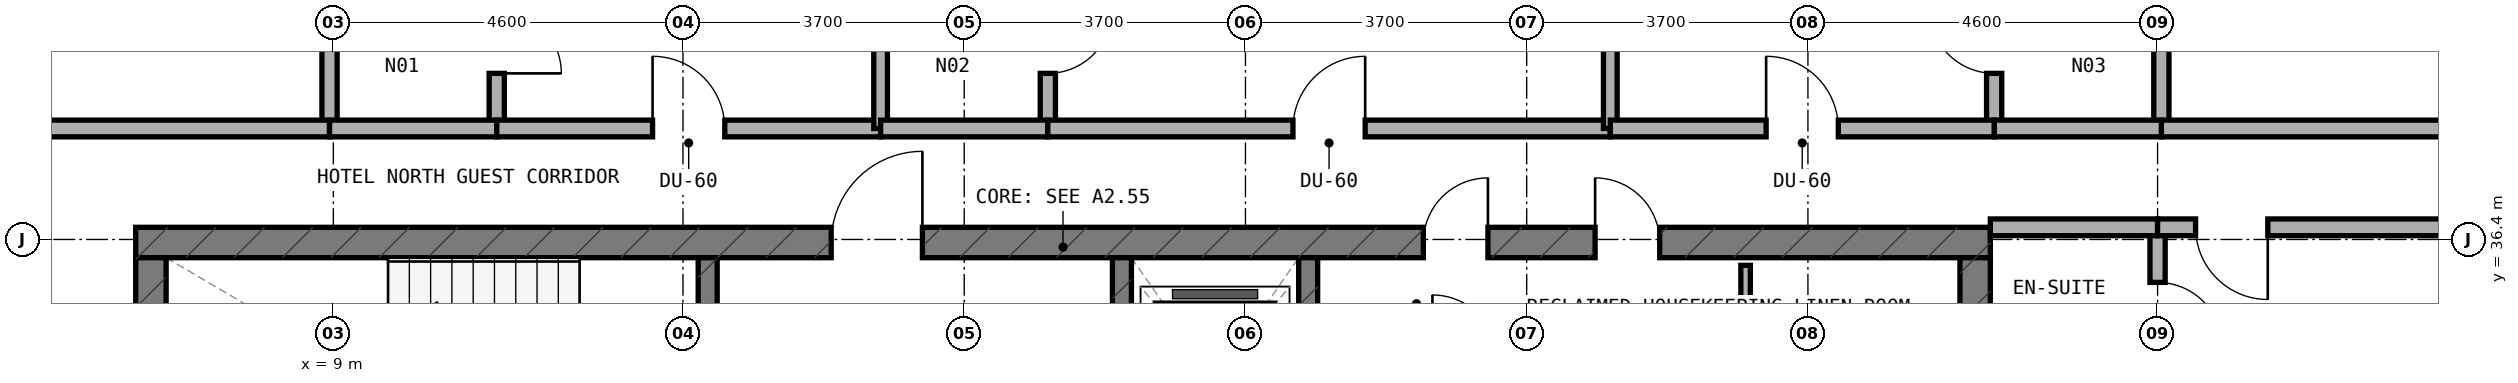
"""IFC4 building model, lengths in metres.
Left out: names, types, materials, properties, quantities, classifications, styles, units other than length and angle.
Written with IfcOpenShell. Run it as: python <this file> out.ifc"""

import sys

from ifc_helpers import new_model, si_unit, direction, frame, frame_2d, origin, place, context, subcontext, project, spatial, rectangle, extrude, element, fill, save


model = new_model("IFC4")
c1 = context("Model", 3, precision=1e-05, world=origin(), true_north=direction((0.0, 1.0)))
c2 = subcontext(c1, "Body", "Model", "MODEL_VIEW")
j1 = project(units=[si_unit("LENGTHUNIT", "METRE"), si_unit("PLANEANGLEUNIT", "RADIAN")], contexts=[c1])
p1 = place(None, origin())
s1 = spatial("IfcSite", under=j1, at=p1, CompositionType="ELEMENT")
p2 = place(p1, origin())
s2 = spatial("IfcBuilding", under=s1, at=p2, CompositionType="ELEMENT")
p3 = place(p2, frame((0.0, 0.0, 254.0)))
s3 = spatial("IfcBuildingStorey", under=s2, at=p3, CompositionType="ELEMENT", Elevation=254.0)
p4 = place(p3, frame((6.4, 36.36, 0.0), z_axis=(0.0, 0.0, 1.0), x_axis=(1.0, 0.0, 0.0)))
e1 = element("IfcWall", 1, at=p4, inside=s3, PredefinedType="SHEAR", context=c2, shape_type="SweptSolid", body=[
    extrude(rectangle(XDim=24.4, YDim=0.4, at=frame_2d((12.2, 0.0))), origin(), (0.0, 0.0, 1.0), 3.6),
])
p5 = place(p4, frame((9.15, 0.0, 0.0)))
e2 = element("IfcOpeningElement", 2, at=p5, cuts=e1, PredefinedType="OPENING", context=c2, shape_type="SweptSolid", body=[
    extrude(rectangle(XDim=1.2, YDim=2.15, at=frame_2d((0.6, 1.075))), frame((0.0, 0.21, 0.0), z_axis=(0.0, -1.0, 0.0), x_axis=(1.0, 0.0, 0.0)), (0.0, 0.0, 1.0), 0.42),
])
p6 = place(p4, frame((19.2, 0.0, 0.0)))
e3 = element("IfcOpeningElement", 3, at=p6, cuts=e1, PredefinedType="OPENING", context=c2, shape_type="SweptSolid", body=[
    extrude(rectangle(XDim=0.85, YDim=2.1, at=frame_2d((0.425, 1.05))), frame((0.0, 0.21, 0.0), z_axis=(0.0, -1.0, 0.0), x_axis=(1.0, 0.0, 0.0)), (0.0, 0.0, 1.0), 0.42),
])
p7 = place(p4, frame((16.94, 0.0, 0.0)))
e4 = element("IfcOpeningElement", 4, at=p7, cuts=e1, PredefinedType="OPENING", context=c2, shape_type="SweptSolid", body=[
    extrude(rectangle(XDim=0.85, YDim=2.1, at=frame_2d((0.425, 1.05))), frame((0.0, 0.21, 0.0), z_axis=(0.0, -1.0, 0.0), x_axis=(1.0, 0.0, 0.0)), (0.0, 0.0, 1.0), 0.42),
])
for number, where, z_axis, x_axis in (
    (5, (6.6, 33.0, 0.0), (0.0, 0.0, 1.0), (0.0, 1.0, 0.0)),
    (6, (30.6, 33.0, 0.0), (0.0, 0.0, 1.0), (0.0, 1.0, 0.0)),
):
    element("IfcWall", number, at=place(p3, frame(where, z_axis=z_axis, x_axis=x_axis)), inside=s3, PredefinedType="SHEAR", context=c2, shape_type="SweptSolid", body=[
        extrude(rectangle(XDim=3.16, YDim=0.4, at=frame_2d((1.58, 0.0))), origin(), (0.0, 0.0, 1.0), 3.6),
    ])
p8 = place(p3, frame((13.925, 33.0, 0.0), z_axis=(0.0, 0.0, 1.0), x_axis=(0.0, 1.0, 0.0)))
e7 = element("IfcWall", 7, at=p8, inside=s3, PredefinedType="STANDARD", context=c2, shape_type="SweptSolid", body=[
    extrude(rectangle(XDim=3.16, YDim=0.25, at=frame_2d((1.58, 0.0))), origin(), (0.0, 0.0, 1.0), 3.32),
])
p9 = place(p8, frame((0.98, 0.0, 0.0)))
e8 = element("IfcOpeningElement", 8, at=p9, cuts=e7, PredefinedType="OPENING", context=c2, shape_type="SweptSolid", body=[
    extrude(rectangle(XDim=1.1, YDim=2.15, at=frame_2d((0.55, 1.075))), frame((0.0, 0.135, 0.0), z_axis=(0.0, -1.0, 0.0), x_axis=(1.0, 0.0, 0.0)), (0.0, 0.0, 1.0), 0.27),
])
p10 = place(p3, frame((19.375, 33.0, 0.0), z_axis=(0.0, 0.0, 1.0), x_axis=(0.0, 1.0, 0.0)))
e9 = element("IfcWall", 9, at=p10, inside=s3, PredefinedType="STANDARD", context=c2, shape_type="SweptSolid", body=[
    extrude(rectangle(XDim=3.16, YDim=0.25, at=frame_2d((1.58, 0.0))), origin(), (0.0, 0.0, 1.0), 3.32),
])
p11 = place(p10, frame((0.98, 0.0, 0.0)))
e10 = element("IfcOpeningElement", 10, at=p11, cuts=e9, PredefinedType="OPENING", context=c2, shape_type="SweptSolid", body=[
    extrude(rectangle(XDim=1.1, YDim=2.15, at=frame_2d((0.55, 1.075))), frame((0.0, 0.135, 0.0), z_axis=(0.0, -1.0, 0.0), x_axis=(1.0, 0.0, 0.0)), (0.0, 0.0, 1.0), 0.27),
])
p12 = place(p3, frame((21.825, 33.0, 0.0), z_axis=(0.0, 0.0, 1.0), x_axis=(0.0, 1.0, 0.0)))
e11 = element("IfcWall", 11, at=p12, inside=s3, PredefinedType="STANDARD", context=c2, shape_type="SweptSolid", body=[
    extrude(rectangle(XDim=3.16, YDim=0.25, at=frame_2d((1.58, 0.0))), origin(), (0.0, 0.0, 1.0), 3.32),
])
p13 = place(p3, frame((27.58, 33.1, 0.0), z_axis=(0.0, 0.0, 1.0), x_axis=(0.0, 1.0, 0.0)))
e12 = element("IfcWall", 12, at=p13, inside=s3, PredefinedType="PARTITIONING", context=c2, shape_type="SweptSolid", body=[
    extrude(rectangle(XDim=2.96, YDim=0.125, at=frame_2d((1.48, 0.0))), origin(), (0.0, 0.0, 1.0), 3.32),
])
p14 = place(p13, frame((1.055, 0.0, 0.0)))
e13 = element("IfcOpeningElement", 13, at=p14, cuts=e12, PredefinedType="OPENING", context=c2, shape_type="SweptSolid", body=[
    extrude(rectangle(XDim=0.85, YDim=2.1, at=frame_2d((0.425, 1.05))), frame((0.0, 0.073, 0.0), z_axis=(0.0, -1.0, 0.0), x_axis=(1.0, 0.0, 0.0)), (0.0, 0.0, 1.0), 0.145),
])
p15 = place(p3, frame((11.15, 37.96, 0.0), z_axis=(0.0, 0.0, 1.0), x_axis=(0.0, 1.0, 0.0)))
e14 = element("IfcWall", 14, at=p15, inside=s3, PredefinedType="PLUMBINGWALL", context=c2, shape_type="SweptSolid", body=[
    extrude(rectangle(XDim=2.1, YDim=0.2, at=frame_2d((1.05, 0.0))), origin(), (0.0, 0.0, 1.0), 2.845),
])
p16 = place(p15, frame((0.625, 0.0, 0.0)))
e15 = element("IfcOpeningElement", 15, at=p16, cuts=e14, PredefinedType="OPENING", context=c2, shape_type="SweptSolid", body=[
    extrude(rectangle(XDim=0.85, YDim=2.1, at=frame_2d((0.425, 1.05))), frame((0.0, 0.11, 0.0), z_axis=(0.0, -1.0, 0.0), x_axis=(1.0, 0.0, 0.0)), (0.0, 0.0, 1.0), 0.22),
])
p17 = place(p3, frame((8.95, 37.96, 0.0), z_axis=(0.0, 0.0, 1.0), x_axis=(0.0, 1.0, 0.0)))
e16 = element("IfcWall", 16, at=p17, inside=s3, PredefinedType="PLUMBINGWALL", context=c2, shape_type="SweptSolid", body=[
    extrude(rectangle(XDim=2.1, YDim=0.2, at=frame_2d((1.05, 0.0))), origin(), (0.0, 0.0, 1.0), 2.845),
])
p18 = place(p3, frame((3.36, 37.86, 0.0), z_axis=(0.0, 0.0, 1.0), x_axis=(1.0, 0.0, 0.0)))
e17 = element("IfcWall", 17, at=p18, inside=s3, PredefinedType="SOLIDWALL", context=c2, shape_type="SweptSolid", body=[
    extrude(rectangle(XDim=5.59, YDim=0.22, at=frame_2d((2.795, 0.0))), origin(), (0.0, 0.0, 1.0), 2.745),
])
p19 = place(p3, frame((8.95, 37.86, 0.0), z_axis=(0.0, 0.0, 1.0), x_axis=(1.0, 0.0, 0.0)))
e18 = element("IfcWall", 18, at=p19, inside=s3, PredefinedType="SOLIDWALL", context=c2, shape_type="SweptSolid", body=[
    extrude(rectangle(XDim=2.2, YDim=0.22, at=frame_2d((1.1, 0.0))), origin(), (0.0, 0.0, 1.0), 3.32),
])
p20 = place(p3, frame((11.15, 37.86, 0.0), z_axis=(0.0, 0.0, 1.0), x_axis=(1.0, 0.0, 0.0)))
e19 = element("IfcWall", 19, at=p20, inside=s3, PredefinedType="SOLIDWALL", context=c2, shape_type="SweptSolid", body=[
    extrude(rectangle(XDim=5.05, YDim=0.22, at=frame_2d((2.525, 0.0))), origin(), (0.0, 0.0, 1.0), 2.745),
])
p21 = place(p20, frame((2.05, 0.0, 0.0)))
e20 = element("IfcOpeningElement", 20, at=p21, cuts=e19, PredefinedType="OPENING", context=c2, shape_type="SweptSolid", body=[
    extrude(rectangle(XDim=0.95, YDim=2.1, at=frame_2d((0.475, 1.05))), frame((0.0, 0.12, 0.0), z_axis=(0.0, -1.0, 0.0), x_axis=(1.0, 0.0, 0.0)), (0.0, 0.0, 1.0), 0.24),
])
p22 = place(p3, frame((16.2, 37.86, 0.0), z_axis=(0.0, 0.0, 1.0), x_axis=(0.0, 1.0, 0.0)))
e21 = element("IfcWall", 21, at=p22, inside=s3, PredefinedType="SOLIDWALL", context=c2, shape_type="SweptSolid", body=[
    extrude(rectangle(XDim=5.28, YDim=0.18, at=frame_2d((2.64, 0.0))), origin(), (0.0, 0.0, 1.0), 2.745),
])
p23 = place(p3, frame((18.4, 37.96, 0.0), z_axis=(0.0, 0.0, 1.0), x_axis=(0.0, 1.0, 0.0)))
e22 = element("IfcWall", 22, at=p23, inside=s3, PredefinedType="PLUMBINGWALL", context=c2, shape_type="SweptSolid", body=[
    extrude(rectangle(XDim=2.1, YDim=0.2, at=frame_2d((1.05, 0.0))), origin(), (0.0, 0.0, 1.0), 2.845),
])
p24 = place(p23, frame((0.625, 0.0, 0.0)))
e23 = element("IfcOpeningElement", 23, at=p24, cuts=e22, PredefinedType="OPENING", context=c2, shape_type="SweptSolid", body=[
    extrude(rectangle(XDim=0.85, YDim=2.1, at=frame_2d((0.425, 1.05))), frame((0.0, 0.11, 0.0), z_axis=(0.0, -1.0, 0.0), x_axis=(1.0, 0.0, 0.0)), (0.0, 0.0, 1.0), 0.22),
])
p25 = place(p3, frame((16.2, 37.86, 0.0), z_axis=(0.0, 0.0, 1.0), x_axis=(1.0, 0.0, 0.0)))
e24 = element("IfcWall", 24, at=p25, inside=s3, PredefinedType="SOLIDWALL", context=c2, shape_type="SweptSolid", body=[
    extrude(rectangle(XDim=2.2, YDim=0.22, at=frame_2d((1.1, 0.0))), origin(), (0.0, 0.0, 1.0), 2.745),
])
p26 = place(p3, frame((18.4, 37.86, 0.0), z_axis=(0.0, 0.0, 1.0), x_axis=(1.0, 0.0, 0.0)))
e25 = element("IfcWall", 25, at=p26, inside=s3, PredefinedType="SOLIDWALL", context=c2, shape_type="SweptSolid", body=[
    extrude(rectangle(XDim=7.4, YDim=0.22, at=frame_2d((3.7, 0.0))), origin(), (0.0, 0.0, 1.0), 2.745),
])
p27 = place(p26, frame((3.225, 0.0, 0.0)))
e26 = element("IfcOpeningElement", 26, at=p27, cuts=e25, PredefinedType="OPENING", context=c2, shape_type="SweptSolid", body=[
    extrude(rectangle(XDim=0.95, YDim=2.1, at=frame_2d((0.475, 1.05))), frame((0.0, 0.12, 0.0), z_axis=(0.0, -1.0, 0.0), x_axis=(1.0, 0.0, 0.0)), (0.0, 0.0, 1.0), 0.24),
])
p28 = place(p3, frame((25.8, 37.86, 0.0), z_axis=(0.0, 0.0, 1.0), x_axis=(0.0, 1.0, 0.0)))
e27 = element("IfcWall", 27, at=p28, inside=s3, PredefinedType="SOLIDWALL", context=c2, shape_type="SweptSolid", body=[
    extrude(rectangle(XDim=5.28, YDim=0.18, at=frame_2d((2.64, 0.0))), origin(), (0.0, 0.0, 1.0), 2.745),
])
p29 = place(p3, frame((30.85, 37.96, 0.0), z_axis=(0.0, 0.0, 1.0), x_axis=(0.0, 1.0, 0.0)))
e28 = element("IfcWall", 28, at=p29, inside=s3, PredefinedType="PLUMBINGWALL", context=c2, shape_type="SweptSolid", body=[
    extrude(rectangle(XDim=2.1, YDim=0.2, at=frame_2d((1.05, 0.0))), origin(), (0.0, 0.0, 1.0), 2.845),
])
p30 = place(p29, frame((0.625, 0.0, 0.0)))
e29 = element("IfcOpeningElement", 29, at=p30, cuts=e28, PredefinedType="OPENING", context=c2, shape_type="SweptSolid", body=[
    extrude(rectangle(XDim=0.85, YDim=2.1, at=frame_2d((0.425, 1.05))), frame((0.0, 0.11, 0.0), z_axis=(0.0, -1.0, 0.0), x_axis=(1.0, 0.0, 0.0)), (0.0, 0.0, 1.0), 0.22),
])
p31 = place(p3, frame((33.05, 37.96, 0.0), z_axis=(0.0, 0.0, 1.0), x_axis=(0.0, 1.0, 0.0)))
e30 = element("IfcWall", 30, at=p31, inside=s3, PredefinedType="PLUMBINGWALL", context=c2, shape_type="SweptSolid", body=[
    extrude(rectangle(XDim=2.1, YDim=0.2, at=frame_2d((1.05, 0.0))), origin(), (0.0, 0.0, 1.0), 2.845),
])
p32 = place(p3, frame((33.05, 37.86, 0.0), z_axis=(0.0, 0.0, 1.0), x_axis=(1.0, 0.0, 0.0)))
e31 = element("IfcWall", 31, at=p32, inside=s3, PredefinedType="SOLIDWALL", context=c2, shape_type="SweptSolid", body=[
    extrude(rectangle(XDim=5.59, YDim=0.22, at=frame_2d((2.795, 0.0))), origin(), (0.0, 0.0, 1.0), 2.745),
])
p33 = place(p3, frame((30.85, 37.86, 0.0), z_axis=(0.0, 0.0, 1.0), x_axis=(1.0, 0.0, 0.0)))
e32 = element("IfcWall", 32, at=p33, inside=s3, PredefinedType="SOLIDWALL", context=c2, shape_type="SweptSolid", body=[
    extrude(rectangle(XDim=2.2, YDim=0.22, at=frame_2d((1.1, 0.0))), origin(), (0.0, 0.0, 1.0), 3.32),
])
p34 = place(p3, frame((25.8, 37.86, 0.0), z_axis=(0.0, 0.0, 1.0), x_axis=(1.0, 0.0, 0.0)))
e33 = element("IfcWall", 33, at=p34, inside=s3, PredefinedType="SOLIDWALL", context=c2, shape_type="SweptSolid", body=[
    extrude(rectangle(XDim=5.05, YDim=0.22, at=frame_2d((2.525, 0.0))), origin(), (0.0, 0.0, 1.0), 2.745),
])
p35 = place(p34, frame((2.05, 0.0, 0.0)))
e34 = element("IfcOpeningElement", 34, at=p35, cuts=e33, PredefinedType="OPENING", context=c2, shape_type="SweptSolid", body=[
    extrude(rectangle(XDim=0.95, YDim=2.1, at=frame_2d((0.475, 1.05))), frame((0.0, 0.12, 0.0), z_axis=(0.0, -1.0, 0.0), x_axis=(1.0, 0.0, 0.0)), (0.0, 0.0, 1.0), 0.24),
])
p36 = place(p3, frame((33.0, 34.36, 0.0), z_axis=(0.0, 0.0, 1.0), x_axis=(0.0, 1.0, 0.0)))
e35 = element("IfcWall", 35, at=p36, inside=s3, PredefinedType="PLUMBINGWALL", context=c2, shape_type="SweptSolid", body=[
    extrude(rectangle(XDim=2.1, YDim=0.2, at=frame_2d((1.05, 0.0))), origin(), (0.0, 0.0, 1.0), 3.32),
])
p37 = place(p36, frame((0.625, 0.0, 0.0)))
e36 = element("IfcOpeningElement", 36, at=p37, cuts=e35, PredefinedType="OPENING", context=c2, shape_type="SweptSolid", body=[
    extrude(rectangle(XDim=0.85, YDim=2.1, at=frame_2d((0.425, 1.05))), frame((0.0, 0.11, 0.0), z_axis=(0.0, -1.0, 0.0), x_axis=(1.0, 0.0, 0.0)), (0.0, 0.0, 1.0), 0.22),
])
p38 = place(p3, frame((30.8, 36.56, 0.0), z_axis=(0.0, 0.0, 1.0), x_axis=(1.0, 0.0, 0.0)))
e37 = element("IfcWall", 37, at=p38, inside=s3, PredefinedType="SOLIDWALL", context=c2, shape_type="SweptSolid", body=[
    extrude(rectangle(XDim=2.2, YDim=0.22, at=frame_2d((1.1, 0.0))), origin(), (0.0, 0.0, 1.0), 3.32),
])
p39 = place(p3, frame((33.0, 36.56, 0.0), z_axis=(0.0, 0.0, 1.0), x_axis=(1.0, 0.0, 0.0)))
e38 = element("IfcWall", 38, at=p39, inside=s3, PredefinedType="SOLIDWALL", context=c2, shape_type="SweptSolid", body=[
    extrude(rectangle(XDim=5.8, YDim=0.22, at=frame_2d((2.9, 0.0))), origin(), (0.0, 0.0, 1.0), 2.745),
])
p40 = place(p39, frame((0.5, 0.0, 0.0)))
e39 = element("IfcOpeningElement", 39, at=p40, cuts=e38, PredefinedType="OPENING", context=c2, shape_type="SweptSolid", body=[
    extrude(rectangle(XDim=0.95, YDim=2.1, at=frame_2d((0.475, 1.05))), frame((0.0, 0.12, 0.0), z_axis=(0.0, -1.0, 0.0), x_axis=(1.0, 0.0, 0.0)), (0.0, 0.0, 1.0), 0.24),
])
p41 = place(p5, origin())
e40 = element("IfcDoor", 40, at=p41, inside=s3, OperationType="SINGLE_SWING_RIGHT", PredefinedType="DOOR", context=c2, shape_type="SweptSolid", body=[
    extrude(rectangle(XDim=1.2, YDim=2.15, at=frame_2d((0.6, 1.075))), frame((0.0, 0.025, 0.0), z_axis=(0.0, -1.0, 0.0), x_axis=(1.0, 0.0, 0.0)), (0.0, 0.0, 1.0), 0.05),
])
fill(e2, e40)
p42 = place(p6, origin())
e41 = element("IfcDoor", 41, at=p42, inside=s3, OperationType="SINGLE_SWING_LEFT", PredefinedType="DOOR", context=c2, shape_type="SweptSolid", body=[
    extrude(rectangle(XDim=0.85, YDim=2.1, at=frame_2d((0.425, 1.05))), frame((0.0, 0.025, 0.0), z_axis=(0.0, -1.0, 0.0), x_axis=(1.0, 0.0, 0.0)), (0.0, 0.0, 1.0), 0.05),
])
fill(e3, e41)
p43 = place(p7, origin())
e42 = element("IfcDoor", 42, at=p43, inside=s3, OperationType="SINGLE_SWING_RIGHT", PredefinedType="DOOR", context=c2, shape_type="SweptSolid", body=[
    extrude(rectangle(XDim=0.85, YDim=2.1, at=frame_2d((0.425, 1.05))), frame((0.0, 0.025, 0.0), z_axis=(0.0, -1.0, 0.0), x_axis=(1.0, 0.0, 0.0)), (0.0, 0.0, 1.0), 0.05),
])
fill(e4, e42)
p44 = place(p16, frame((0.85, 0.0, 0.0), z_axis=(0.0, 0.0, 1.0), x_axis=(-1.0, 0.0, 0.0)))
e43 = element("IfcDoor", 43, at=p44, inside=s3, OperationType="SINGLE_SWING_RIGHT", PredefinedType="DOOR", context=c2, shape_type="SweptSolid", body=[
    extrude(rectangle(XDim=0.85, YDim=2.1, at=frame_2d((0.425, 1.05))), frame((0.0, 0.025, 0.0), z_axis=(0.0, -1.0, 0.0), x_axis=(1.0, 0.0, 0.0)), (0.0, 0.0, 1.0), 0.05),
])
fill(e15, e43)
p45 = place(p21, origin())
e44 = element("IfcDoor", 44, at=p45, inside=s3, OperationType="SINGLE_SWING_LEFT", PredefinedType="DOOR", context=c2, shape_type="SweptSolid", body=[
    extrude(rectangle(XDim=0.95, YDim=2.1, at=frame_2d((0.475, 1.05))), frame((0.0, 0.025, 0.0), z_axis=(0.0, -1.0, 0.0), x_axis=(1.0, 0.0, 0.0)), (0.0, 0.0, 1.0), 0.05),
])
fill(e20, e44)
p46 = place(p24, frame((0.85, 0.0, 0.0), z_axis=(0.0, 0.0, 1.0), x_axis=(-1.0, 0.0, 0.0)))
e45 = element("IfcDoor", 45, at=p46, inside=s3, OperationType="SINGLE_SWING_LEFT", PredefinedType="DOOR", context=c2, shape_type="SweptSolid", body=[
    extrude(rectangle(XDim=0.85, YDim=2.1, at=frame_2d((0.425, 1.05))), frame((0.0, 0.025, 0.0), z_axis=(0.0, -1.0, 0.0), x_axis=(1.0, 0.0, 0.0)), (0.0, 0.0, 1.0), 0.05),
])
fill(e23, e45)
p47 = place(p27, origin())
e46 = element("IfcDoor", 46, at=p47, inside=s3, OperationType="SINGLE_SWING_RIGHT", PredefinedType="DOOR", context=c2, shape_type="SweptSolid", body=[
    extrude(rectangle(XDim=0.95, YDim=2.1, at=frame_2d((0.475, 1.05))), frame((0.0, 0.025, 0.0), z_axis=(0.0, -1.0, 0.0), x_axis=(1.0, 0.0, 0.0)), (0.0, 0.0, 1.0), 0.05),
])
fill(e26, e46)
p48 = place(p30, origin())
e47 = element("IfcDoor", 47, at=p48, inside=s3, OperationType="SINGLE_SWING_RIGHT", PredefinedType="DOOR", context=c2, shape_type="SweptSolid", body=[
    extrude(rectangle(XDim=0.85, YDim=2.1, at=frame_2d((0.425, 1.05))), frame((0.0, 0.025, 0.0), z_axis=(0.0, -1.0, 0.0), x_axis=(1.0, 0.0, 0.0)), (0.0, 0.0, 1.0), 0.05),
])
fill(e29, e47)
p49 = place(p35, origin())
e48 = element("IfcDoor", 48, at=p49, inside=s3, OperationType="SINGLE_SWING_LEFT", PredefinedType="DOOR", context=c2, shape_type="SweptSolid", body=[
    extrude(rectangle(XDim=0.95, YDim=2.1, at=frame_2d((0.475, 1.05))), frame((0.0, 0.025, 0.0), z_axis=(0.0, -1.0, 0.0), x_axis=(1.0, 0.0, 0.0)), (0.0, 0.0, 1.0), 0.05),
])
fill(e34, e48)
p50 = place(p37, frame((0.85, 0.0, 0.0), z_axis=(0.0, 0.0, 1.0), x_axis=(-1.0, 0.0, 0.0)))
e49 = element("IfcDoor", 49, at=p50, inside=s3, OperationType="SINGLE_SWING_RIGHT", PredefinedType="DOOR", context=c2, shape_type="SweptSolid", body=[
    extrude(rectangle(XDim=0.85, YDim=2.1, at=frame_2d((0.425, 1.05))), frame((0.0, 0.025, 0.0), z_axis=(0.0, -1.0, 0.0), x_axis=(1.0, 0.0, 0.0)), (0.0, 0.0, 1.0), 0.05),
])
fill(e36, e49)
p51 = place(p40, frame((0.95, 0.0, 0.0), z_axis=(0.0, 0.0, 1.0), x_axis=(-1.0, 0.0, 0.0)))
e50 = element("IfcDoor", 50, at=p51, inside=s3, OperationType="SINGLE_SWING_LEFT", PredefinedType="DOOR", context=c2, shape_type="SweptSolid", body=[
    extrude(rectangle(XDim=0.95, YDim=2.1, at=frame_2d((0.475, 1.05))), frame((0.0, 0.025, 0.0), z_axis=(0.0, -1.0, 0.0), x_axis=(1.0, 0.0, 0.0)), (0.0, 0.0, 1.0), 0.05),
])
fill(e39, e50)
save(model, sys.argv[1])
